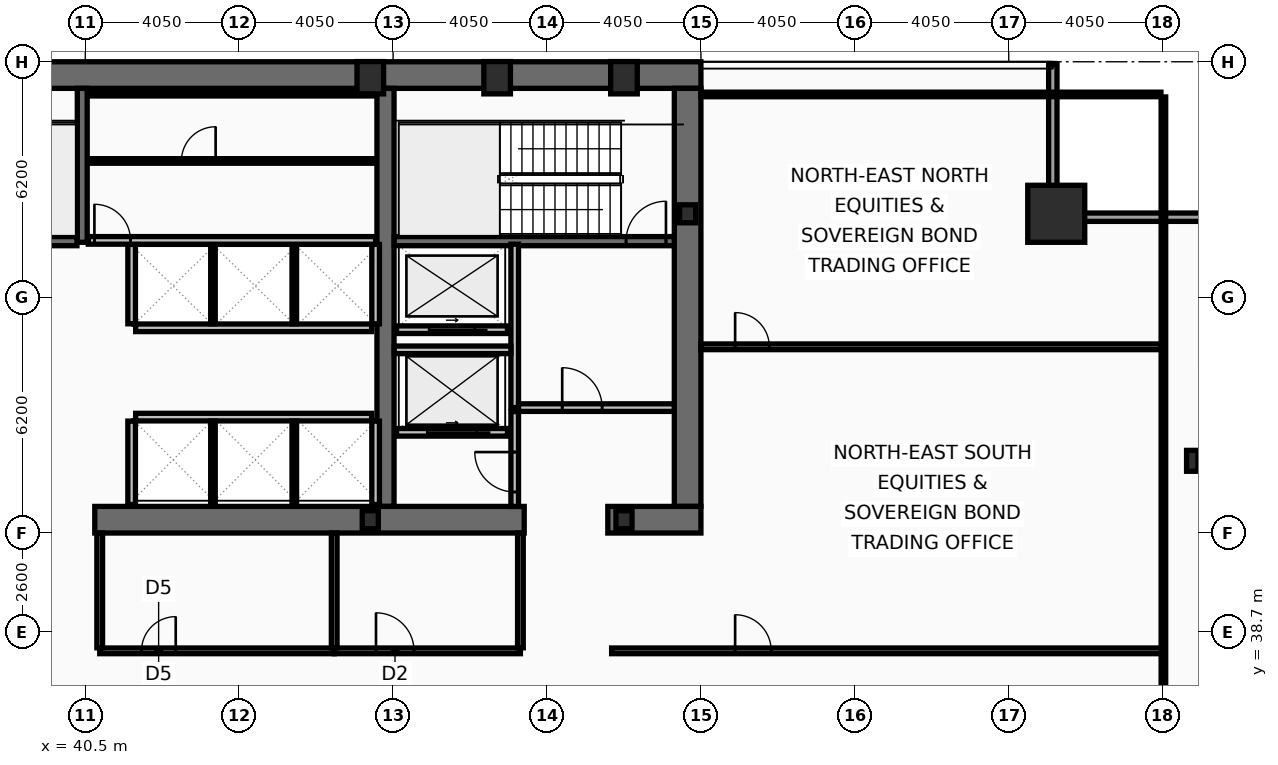
"""IFC4 building model, lengths in metres.
Left out: names, types, materials, properties, quantities, classifications, styles, units other than length and angle.
Written with IfcOpenShell. Run it as: python <this file> out.ifc"""

import sys

from ifc_helpers import new_model, si_unit, direction, frame, frame_2d, origin, origin_2d, place, context, subcontext, project, spatial, rectangle, hollow_rectangle, i_section, extrude, element, fill, save


model = new_model("IFC4")
c1 = context("Model", 3, precision=1e-05, world=origin(), true_north=direction((0.0, 1.0)))
c2 = subcontext(c1, "Body", "Model", "MODEL_VIEW")
j1 = project(units=[si_unit("LENGTHUNIT", "METRE"), si_unit("PLANEANGLEUNIT", "RADIAN")], contexts=[c1])
p1 = place(None, origin())
s1 = spatial("IfcSite", under=j1, at=p1, CompositionType="ELEMENT")
p2 = place(p1, origin())
s2 = spatial("IfcBuilding", under=s1, at=p2, CompositionType="ELEMENT")
p3 = place(p2, frame((0.0, 0.0, 94.6)))
s3 = spatial("IfcBuildingStorey", under=s2, at=p3, CompositionType="ELEMENT", Elevation=94.6)
p4 = place(p3, frame((16.2, 53.35, 0.0), z_axis=(0.0, 0.0, 1.0), x_axis=(1.0, 0.0, 0.0)))
e1 = element("IfcWall", 1, at=p4, inside=s3, PredefinedType="SHEAR", context=c2, shape_type="SweptSolid", body=[
    extrude(rectangle(XDim=40.5, YDim=0.7, at=frame_2d((20.25, 0.0))), origin(), (0.0, 0.0, 1.0), 3.82),
])
p5 = place(p3, frame((56.35, 53.0, 0.0), z_axis=(0.0, 0.0, 1.0), x_axis=(0.0, -1.0, 0.0)))
e2 = element("IfcWall", 2, at=p5, inside=s3, PredefinedType="SHEAR", context=c2, shape_type="SweptSolid", body=[
    extrude(rectangle(XDim=11.0, YDim=0.7, at=frame_2d((5.5, 0.0))), origin(), (0.0, 0.0, 1.0), 3.82),
])
p6 = place(p3, frame((48.4, 42.0, 0.0), z_axis=(0.0, 0.0, 1.0), x_axis=(0.0, 1.0, 0.0)))
e3 = element("IfcWall", 3, at=p6, inside=s3, PredefinedType="SHEAR", context=c2, shape_type="SweptSolid", body=[
    extrude(rectangle(XDim=11.0, YDim=0.45, at=frame_2d((5.5, 0.0))), origin(), (0.0, 0.0, 1.0), 3.82),
])
p7 = place(p3, frame((52.05, 41.65, 0.0), z_axis=(0.0, 0.0, 1.0), x_axis=(-1.0, 0.0, 0.0)))
e4 = element("IfcWall", 4, at=p7, inside=s3, PredefinedType="SHEAR", context=c2, shape_type="SweptSolid", body=[
    extrude(rectangle(XDim=11.3, YDim=0.7, at=frame_2d((5.65, 0.0))), origin(), (0.0, 0.0, 1.0), 3.82),
])
p8 = place(p3, frame((56.7, 41.65, 0.0), z_axis=(0.0, 0.0, 1.0), x_axis=(-1.0, 0.0, 0.0)))
e5 = element("IfcWall", 5, at=p8, inside=s3, PredefinedType="SHEAR", context=c2, shape_type="SweptSolid", body=[
    extrude(rectangle(XDim=2.45, YDim=0.7, at=frame_2d((1.225, 0.0))), origin(), (0.0, 0.0, 1.0), 3.82),
])
p9 = place(p3, frame((40.42, 48.95, 0.0), z_axis=(0.0, 0.0, 1.0), x_axis=(0.0, 1.0, 0.0)))
e6 = element("IfcWall", 6, at=p9, inside=s3, PredefinedType="SHEAR", context=c2, shape_type="SweptSolid", body=[
    extrude(rectangle(XDim=4.05, YDim=0.26, at=frame_2d((2.025, 0.0))), origin(), (0.0, 0.0, 1.0), 3.82),
])
p10 = place(p3, frame((48.63, 48.98, 0.0), z_axis=(0.0, 0.0, 1.0), x_axis=(1.0, 0.0, 0.0)))
e7 = element("IfcWall", 7, at=p10, inside=s3, PredefinedType="SHEAR", context=c2, shape_type="SweptSolid", body=[
    extrude(rectangle(XDim=7.37, YDim=0.24, at=frame_2d((3.685, 0.0))), origin(), (0.0, 0.0, 1.0), 3.82),
])
p11 = place(p10, frame((6.1, 0.0, 0.0)))
e8 = element("IfcOpeningElement", 8, at=p11, cuts=e7, PredefinedType="OPENING", context=c2, shape_type="SweptSolid", body=[
    extrude(rectangle(XDim=1.05, YDim=2.15, at=frame_2d((0.525, 1.075))), frame((0.0, 0.13, 0.0), z_axis=(0.0, -1.0, 0.0), x_axis=(1.0, 0.0, 0.0)), (0.0, 0.0, 1.0), 0.26),
])
p12 = place(p3, frame((32.72, 48.98, 0.0), z_axis=(0.0, 0.0, 1.0), x_axis=(1.0, 0.0, 0.0)))
e9 = element("IfcWall", 9, at=p12, inside=s3, PredefinedType="SHEAR", context=c2, shape_type="SweptSolid", body=[
    extrude(rectangle(XDim=7.56, YDim=0.24, at=frame_2d((3.78, 0.0))), origin(), (0.0, 0.0, 1.0), 3.82),
])
p13 = place(p12, frame((0.22, 0.0, 0.0)))
e10 = element("IfcOpeningElement", 10, at=p13, cuts=e9, PredefinedType="OPENING", context=c2, shape_type="SweptSolid", body=[
    extrude(rectangle(XDim=1.05, YDim=2.15, at=frame_2d((0.525, 1.075))), frame((0.0, 0.13, 0.0), z_axis=(0.0, -1.0, 0.0), x_axis=(1.0, 0.0, 0.0)), (0.0, 0.0, 1.0), 0.26),
])
p14 = place(p3, frame((66.05, 49.7, 0.0), z_axis=(0.0, 0.0, 1.0), x_axis=(1.0, 0.0, 0.0)))
e11 = element("IfcColumn", 11, at=p14, inside=s3, PredefinedType="COLUMN", context=c2, shape_type="SweptSolid", body=[
    extrude(hollow_rectangle(XDim=1.5, YDim=1.5, WallThickness=0.07, at=origin_2d()), origin(), (0.0, 0.0, 1.0), 4.0),
])
for number, where, z_axis, x_axis in (
    (12, (48.0, 53.28, 0.0), (0.0, 0.0, 1.0), (1.0, 0.0, 0.0)),
    (13, (51.337, 53.28, 0.0), (0.0, 0.0, 1.0), (1.0, 0.0, 0.0)),
    (14, (54.675, 53.28, 0.0), (0.0, 0.0, 1.0), (1.0, 0.0, 0.0)),
):
    element("IfcColumn", number, at=place(p3, frame(where, z_axis=z_axis, x_axis=x_axis)), inside=s3, PredefinedType="COLUMN", context=c2, shape_type="SweptSolid", body=[
        extrude(hollow_rectangle(XDim=0.7, YDim=0.85, WallThickness=0.05, at=origin_2d()), origin(), (0.0, 0.0, 1.0), 4.0),
    ])
p15 = place(p3, frame((69.63, 43.2, 0.0), z_axis=(0.0, 0.0, 1.0), x_axis=(1.0, 0.0, 0.0)))
e15 = element("IfcColumn", 15, at=p15, inside=s3, PredefinedType="COLUMN", context=c2, shape_type="SweptSolid", body=[
    extrude(i_section(OverallWidth=0.3, OverallDepth=0.55, WebThickness=0.015, FlangeThickness=0.029, at=origin_2d()), origin(), (0.0, 0.0, 1.0), 4.0),
])
for number, where, z_axis, x_axis in (
    (16, (56.35, 49.7, 0.0), (0.0, 0.0, 1.0), (1.0, 0.0, 0.0)),
    (17, (48.0, 41.65, 0.0), (0.0, 0.0, 1.0), (1.0, 0.0, 0.0)),
    (18, (54.675, 41.65, 0.0), (0.0, 0.0, 1.0), (1.0, 0.0, 0.0)),
):
    element("IfcColumn", number, at=place(p3, frame(where, z_axis=z_axis, x_axis=x_axis)), inside=s3, PredefinedType="COLUMN", context=c2, shape_type="SweptSolid", body=[
        extrude(i_section(OverallWidth=0.424, OverallDepth=0.474, WebThickness=0.048, FlangeThickness=0.077, at=origin_2d()), origin(), (0.0, 0.0, 1.0), 4.0),
    ])
p16 = place(p3, frame((65.96, 53.63, 0.0), z_axis=(0.0, 0.0, 1.0), x_axis=(0.0, -1.0, 0.0)))
e19 = element("IfcWall", 19, at=p16, inside=s3, PredefinedType="SOLIDWALL", context=c2, shape_type="SweptSolid", body=[
    extrude(rectangle(XDim=3.91, YDim=0.22, at=frame_2d((1.955, 0.0))), origin(), (0.0, 0.0, 1.0), 3.16),
])
p17 = place(p3, frame((65.85, 49.61, 0.0), z_axis=(0.0, 0.0, 1.0), x_axis=(1.0, 0.0, 0.0)))
e20 = element("IfcWall", 20, at=p17, inside=s3, PredefinedType="SOLIDWALL", context=c2, shape_type="SweptSolid", body=[
    extrude(rectangle(XDim=4.22, YDim=0.22, at=frame_2d((2.11, 0.0))), origin(), (0.0, 0.0, 1.0), 3.16),
])
p18 = place(p3, frame((51.61, 43.95, 0.0), z_axis=(0.0, 0.0, 1.0), x_axis=(-1.0, 0.0, 0.0)))
e21 = element("IfcWall", 21, at=p18, inside=s3, PredefinedType="PARTITIONING", context=c2, shape_type="SweptSolid", body=[
    extrude(rectangle(XDim=2.92, YDim=0.2, at=frame_2d((1.46, 0.0))), origin(), (0.0, 0.0, 1.0), 3.82),
])
p19 = place(p18, frame((0.81, 0.0, 0.0)))
e22 = element("IfcOpeningElement", 22, at=p19, cuts=e21, PredefinedType="OPENING", context=c2, shape_type="SweptSolid", body=[
    extrude(rectangle(XDim=1.3, YDim=2.18, at=frame_2d((0.65, 1.09))), frame((0.0, 0.11, 0.0), z_axis=(0.0, -1.0, 0.0), x_axis=(1.0, 0.0, 0.0)), (0.0, 0.0, 1.0), 0.22),
])
p20 = place(p3, frame((51.61, 46.65, 0.0), z_axis=(0.0, 0.0, 1.0), x_axis=(-1.0, 0.0, 0.0)))
e23 = element("IfcWall", 23, at=p20, inside=s3, PredefinedType="PARTITIONING", context=c2, shape_type="SweptSolid", body=[
    extrude(rectangle(XDim=2.92, YDim=0.2, at=frame_2d((1.46, 0.0))), origin(), (0.0, 0.0, 1.0), 3.82),
])
p21 = place(p20, frame((0.86, 0.0, 0.0)))
e24 = element("IfcOpeningElement", 24, at=p21, cuts=e23, PredefinedType="OPENING", context=c2, shape_type="SweptSolid", body=[
    extrude(rectangle(XDim=1.2, YDim=2.18, at=frame_2d((0.6, 1.09))), frame((0.0, 0.11, 0.0), z_axis=(0.0, -1.0, 0.0), x_axis=(1.0, 0.0, 0.0)), (0.0, 0.0, 1.0), 0.22),
])
p22 = place(p3, frame((51.8, 44.6, 0.0), z_axis=(0.0, 0.0, 1.0), x_axis=(0.0, 1.0, 0.0)))
e25 = element("IfcWall", 25, at=p22, inside=s3, PredefinedType="PARTITIONING", context=c2, shape_type="SweptSolid", body=[
    extrude(rectangle(XDim=4.3, YDim=0.2, at=frame_2d((2.15, 0.0))), origin(), (0.0, 0.0, 1.0), 3.82),
])
p23 = place(p3, frame((51.9, 44.6, 0.0), z_axis=(0.0, 0.0, 1.0), x_axis=(1.0, 0.0, 0.0)))
e26 = element("IfcWall", 26, at=p23, inside=s3, PredefinedType="PARTITIONING", context=c2, shape_type="SweptSolid", body=[
    extrude(rectangle(XDim=4.1, YDim=0.2, at=frame_2d((2.05, 0.0))), origin(), (0.0, 0.0, 1.0), 3.82),
])
p24 = place(p23, frame((1.15, 0.0, 0.0)))
e27 = element("IfcOpeningElement", 27, at=p24, cuts=e26, PredefinedType="OPENING", context=c2, shape_type="SweptSolid", body=[
    extrude(rectangle(XDim=1.05, YDim=2.15, at=frame_2d((0.525, 1.075))), frame((0.0, 0.11, 0.0), z_axis=(0.0, -1.0, 0.0), x_axis=(1.0, 0.0, 0.0)), (0.0, 0.0, 1.0), 0.22),
])
p25 = place(p3, frame((48.63, 46.12, 0.0), z_axis=(0.0, 0.0, 1.0), x_axis=(1.0, 0.0, 0.0)))
e28 = element("IfcWall", 28, at=p25, inside=s3, PredefinedType="PARTITIONING", context=c2, shape_type="SweptSolid", body=[
    extrude(rectangle(XDim=3.07, YDim=0.2, at=frame_2d((1.535, 0.0))), origin(), (0.0, 0.0, 1.0), 3.82),
])
p26 = place(p3, frame((51.8, 42.0, 0.0), z_axis=(0.0, 0.0, 1.0), x_axis=(0.0, 1.0, 0.0)))
e29 = element("IfcWall", 29, at=p26, inside=s3, PredefinedType="PARTITIONING", context=c2, shape_type="SweptSolid", body=[
    extrude(rectangle(XDim=2.495, YDim=0.2, at=frame_2d((1.248, 0.0))), origin(), (0.0, 0.0, 1.0), 3.82),
])
p27 = place(p26, frame((0.38, 0.0, 0.0)))
e30 = element("IfcOpeningElement", 30, at=p27, cuts=e29, PredefinedType="OPENING", context=c2, shape_type="SweptSolid", body=[
    extrude(rectangle(XDim=1.05, YDim=2.15, at=frame_2d((0.525, 1.075))), frame((0.0, 0.11, 0.0), z_axis=(0.0, -1.0, 0.0), x_axis=(1.0, 0.0, 0.0)), (0.0, 0.0, 1.0), 0.22),
])
p28 = place(p3, frame((41.825, 46.7, 0.0), z_axis=(0.0, 0.0, 1.0), x_axis=(1.0, 0.0, 0.0)))
e31 = element("IfcWall", 31, at=p28, inside=s3, PredefinedType="PARTITIONING", context=c2, shape_type="SweptSolid", body=[
    extrude(rectangle(XDim=6.21, YDim=0.2, at=frame_2d((3.105, 0.0))), origin(), (0.0, 0.0, 1.0), 3.82),
])
for number, where, z_axis, x_axis in (
    (32, (41.72, 46.805, 0.0), (0.0, 0.0, 1.0), (0.0, 1.0, 0.0)),
    (33, (48.14, 46.805, 0.0), (0.0, 0.0, 1.0), (0.0, 1.0, 0.0)),
):
    element("IfcWall", number, at=place(p3, frame(where, z_axis=z_axis, x_axis=x_axis)), inside=s3, PredefinedType="PARTITIONING", context=c2, shape_type="SweptSolid", body=[
        extrude(rectangle(XDim=2.09, YDim=0.2, at=frame_2d((1.045, 0.0))), origin(), (0.0, 0.0, 1.0), 3.82),
    ])
for number, where, z_axis, x_axis in (
    (34, (43.86, 46.805, 0.0), (0.0, 0.0, 1.0), (0.0, 1.0, 0.0)),
    (35, (46.0, 46.805, 0.0), (0.0, 0.0, 1.0), (0.0, 1.0, 0.0)),
):
    element("IfcWall", number, at=place(p3, frame(where, z_axis=z_axis, x_axis=x_axis)), inside=s3, PredefinedType="PARTITIONING", context=c2, shape_type="SweptSolid", body=[
        extrude(rectangle(XDim=2.09, YDim=0.12, at=frame_2d((1.045, 0.0))), origin(), (0.0, 0.0, 1.0), 3.82),
    ])
p29 = place(p3, frame((41.825, 44.35, 0.0), z_axis=(0.0, 0.0, 1.0), x_axis=(1.0, 0.0, 0.0)))
e36 = element("IfcWall", 36, at=p29, inside=s3, PredefinedType="PARTITIONING", context=c2, shape_type="SweptSolid", body=[
    extrude(rectangle(XDim=6.21, YDim=0.2, at=frame_2d((3.105, 0.0))), origin(), (0.0, 0.0, 1.0), 3.82),
])
for number, where, z_axis, x_axis in (
    (37, (41.72, 42.05, 0.0), (0.0, 0.0, 1.0), (0.0, 1.0, 0.0)),
    (38, (48.14, 42.05, 0.0), (0.0, 0.0, 1.0), (0.0, 1.0, 0.0)),
):
    element("IfcWall", number, at=place(p3, frame(where, z_axis=z_axis, x_axis=x_axis)), inside=s3, PredefinedType="PARTITIONING", context=c2, shape_type="SweptSolid", body=[
        extrude(rectangle(XDim=2.195, YDim=0.2, at=frame_2d((1.098, 0.0))), origin(), (0.0, 0.0, 1.0), 3.82),
    ])
for number, where, z_axis, x_axis in (
    (39, (43.86, 42.05, 0.0), (0.0, 0.0, 1.0), (0.0, 1.0, 0.0)),
    (40, (46.0, 42.05, 0.0), (0.0, 0.0, 1.0), (0.0, 1.0, 0.0)),
):
    element("IfcWall", number, at=place(p3, frame(where, z_axis=z_axis, x_axis=x_axis)), inside=s3, PredefinedType="PARTITIONING", context=c2, shape_type="SweptSolid", body=[
        extrude(rectangle(XDim=2.195, YDim=0.12, at=frame_2d((1.098, 0.0))), origin(), (0.0, 0.0, 1.0), 3.82),
    ])
p30 = place(p3, frame((40.58, 52.86, 0.0), z_axis=(0.0, 0.0, 1.0), x_axis=(1.0, 0.0, 0.0)))
e41 = element("IfcWall", 41, at=p30, inside=s3, PredefinedType="PARTITIONING", context=c2, shape_type="SweptSolid", body=[
    extrude(rectangle(XDim=7.56, YDim=0.12, at=frame_2d((3.78, 0.0))), origin(), (0.0, 0.0, 1.0), 3.82),
])
p31 = place(p3, frame((40.58, 49.0, 0.0), z_axis=(0.0, 0.0, 1.0), x_axis=(1.0, 0.0, 0.0)))
e42 = element("IfcWall", 42, at=p31, inside=s3, PredefinedType="PARTITIONING", context=c2, shape_type="SweptSolid", body=[
    extrude(rectangle(XDim=7.56, YDim=0.2, at=frame_2d((3.78, 0.0))), origin(), (0.0, 0.0, 1.0), 3.82),
])
p32 = place(p31, frame((0.16, 0.0, 0.0)))
e43 = element("IfcOpeningElement", 43, at=p32, cuts=e42, PredefinedType="OPENING", context=c2, shape_type="SweptSolid", body=[
    extrude(rectangle(XDim=0.95, YDim=2.1, at=frame_2d((0.475, 1.05))), frame((0.0, 0.11, 0.0), z_axis=(0.0, -1.0, 0.0), x_axis=(1.0, 0.0, 0.0)), (0.0, 0.0, 1.0), 0.22),
])
p33 = place(p3, frame((40.63, 51.09, 0.0), z_axis=(0.0, 0.0, 1.0), x_axis=(1.0, 0.0, 0.0)))
e44 = element("IfcWall", 44, at=p33, inside=s3, PredefinedType="PARTITIONING", context=c2, shape_type="SweptSolid", body=[
    extrude(rectangle(XDim=7.46, YDim=0.12, at=frame_2d((3.73, 0.0))), origin(), (0.0, 0.0, 1.0), 3.82),
])
p34 = place(p33, frame((2.4, 0.0, 0.0)))
e45 = element("IfcOpeningElement", 45, at=p34, cuts=e44, PredefinedType="OPENING", context=c2, shape_type="SweptSolid", body=[
    extrude(rectangle(XDim=0.9, YDim=2.05, at=frame_2d((0.45, 1.025))), frame((0.0, 0.07, 0.0), z_axis=(0.0, -1.0, 0.0), x_axis=(1.0, 0.0, 0.0)), (0.0, 0.0, 1.0), 0.14),
])
p35 = place(p3, frame((40.88, 38.2, 0.0), z_axis=(0.0, 0.0, 1.0), x_axis=(1.0, 0.0, 0.0)))
e46 = element("IfcWall", 46, at=p35, inside=s3, PredefinedType="PARTITIONING", context=c2, shape_type="SweptSolid", body=[
    extrude(rectangle(XDim=6.17, YDim=0.15, at=frame_2d((3.085, 0.0))), origin(), (0.0, 0.0, 1.0), 3.01),
])
p36 = place(p35, frame((1.1, 0.0, 0.0)))
e47 = element("IfcOpeningElement", 47, at=p36, cuts=e46, PredefinedType="OPENING", context=c2, shape_type="SweptSolid", body=[
    extrude(rectangle(XDim=0.9, YDim=2.05, at=frame_2d((0.45, 1.025))), frame((0.0, 0.085, 0.0), z_axis=(0.0, -1.0, 0.0), x_axis=(1.0, 0.0, 0.0)), (0.0, 0.0, 1.0), 0.17),
])
p37 = place(p3, frame((47.05, 38.2, 0.0), z_axis=(0.0, 0.0, 1.0), x_axis=(1.0, 0.0, 0.0)))
e48 = element("IfcWall", 48, at=p37, inside=s3, PredefinedType="PARTITIONING", context=c2, shape_type="SweptSolid", body=[
    extrude(rectangle(XDim=4.9, YDim=0.15, at=frame_2d((2.45, 0.0))), origin(), (0.0, 0.0, 1.0), 3.01),
])
p38 = place(p37, frame((1.1, 0.0, 0.0)))
e49 = element("IfcOpeningElement", 49, at=p38, cuts=e48, PredefinedType="OPENING", context=c2, shape_type="SweptSolid", body=[
    extrude(rectangle(XDim=1.0, YDim=2.05, at=frame_2d((0.5, 1.025))), frame((0.0, 0.085, 0.0), z_axis=(0.0, -1.0, 0.0), x_axis=(1.0, 0.0, 0.0)), (0.0, 0.0, 1.0), 0.17),
])
for number, where, z_axis, x_axis in (
    (50, (40.88, 38.28, 0.0), (0.0, 0.0, 1.0), (0.0, 1.0, 0.0)),
    (51, (47.05, 38.28, 0.0), (0.0, 0.0, 1.0), (0.0, 1.0, 0.0)),
    (52, (51.95, 38.28, 0.0), (0.0, 0.0, 1.0), (0.0, 1.0, 0.0)),
):
    element("IfcWall", number, at=place(p3, frame(where, z_axis=z_axis, x_axis=x_axis)), inside=s3, PredefinedType="PARTITIONING", context=c2, shape_type="SweptSolid", body=[
        extrude(rectangle(XDim=3.02, YDim=0.15, at=frame_2d((1.51, 0.0))), origin(), (0.0, 0.0, 1.0), 3.82),
    ])
p39 = place(p3, frame((54.35, 38.2, 0.0), z_axis=(0.0, 0.0, 1.0), x_axis=(1.0, 0.0, 0.0)))
e53 = element("IfcWall", 53, at=p39, inside=s3, PredefinedType="PARTITIONING", context=c2, shape_type="SweptSolid", body=[
    extrude(rectangle(XDim=14.52, YDim=0.15, at=frame_2d((7.26, 0.0))), origin(), (0.0, 0.0, 1.0), 3.01),
])
p40 = place(p39, frame((3.25, 0.0, 0.0)))
e54 = element("IfcOpeningElement", 54, at=p40, cuts=e53, PredefinedType="OPENING", context=c2, shape_type="SweptSolid", body=[
    extrude(rectangle(XDim=0.95, YDim=2.05, at=frame_2d((0.475, 1.025))), frame((0.0, 0.085, 0.0), z_axis=(0.0, -1.0, 0.0), x_axis=(1.0, 0.0, 0.0)), (0.0, 0.0, 1.0), 0.17),
])
p41 = place(p3, frame((56.7, 46.2, 0.0), z_axis=(0.0, 0.0, 1.0), x_axis=(1.0, 0.0, 0.0)))
e55 = element("IfcWall", 55, at=p41, inside=s3, PredefinedType="PARTITIONING", context=c2, shape_type="SweptSolid", body=[
    extrude(rectangle(XDim=12.105, YDim=0.15, at=frame_2d((6.052, 0.0))), origin(), (0.0, 0.0, 1.0), 3.16),
])
p42 = place(p41, frame((0.9, 0.0, 0.0)))
e56 = element("IfcOpeningElement", 56, at=p42, cuts=e55, PredefinedType="OPENING", context=c2, shape_type="SweptSolid", body=[
    extrude(rectangle(XDim=0.9, YDim=2.05, at=frame_2d((0.45, 1.025))), frame((0.0, 0.085, 0.0), z_axis=(0.0, -1.0, 0.0), x_axis=(1.0, 0.0, 0.0)), (0.0, 0.0, 1.0), 0.17),
])
p43 = place(p3, frame((68.87, 10.665, 0.0), z_axis=(0.0, 0.0, 1.0), x_axis=(0.0, 1.0, 0.0)))
e57 = element("IfcWall", 57, at=p43, inside=s3, PredefinedType="PARTITIONING", context=c2, shape_type="SweptSolid", body=[
    extrude(rectangle(XDim=42.11, YDim=0.12, at=frame_2d((21.055, 0.0))), origin(), (0.0, 0.0, 1.0), 3.01),
])
p44 = place(p3, frame((56.7, 52.84, 0.0), z_axis=(0.0, 0.0, 1.0), x_axis=(1.0, 0.0, 0.0)))
e58 = element("IfcWall", 58, at=p44, inside=s3, PredefinedType="PARTITIONING", context=c2, shape_type="SweptSolid", body=[
    extrude(rectangle(XDim=12.105, YDim=0.12, at=frame_2d((6.052, 0.0))), origin(), (0.0, 0.0, 1.0), 3.82),
])
p45 = place(p11, origin())
e59 = element("IfcDoor", 59, at=p45, inside=s3, OperationType="SINGLE_SWING_RIGHT", PredefinedType="DOOR", context=c2, shape_type="SweptSolid", body=[
    extrude(rectangle(XDim=1.05, YDim=2.15, at=frame_2d((0.525, 1.075))), frame((0.0, 0.025, 0.0), z_axis=(0.0, -1.0, 0.0), x_axis=(1.0, 0.0, 0.0)), (0.0, 0.0, 1.0), 0.05),
])
fill(e8, e59)
p46 = place(p19, origin())
e60 = element("IfcDoor", 60, at=p46, inside=s3, OperationType="SLIDING_TO_LEFT", PredefinedType="DOOR", context=c2, shape_type="SweptSolid", body=[
    extrude(rectangle(XDim=1.3, YDim=2.18, at=frame_2d((0.65, 1.09))), frame((0.0, 0.025, 0.0), z_axis=(0.0, -1.0, 0.0), x_axis=(1.0, 0.0, 0.0)), (0.0, 0.0, 1.0), 0.05),
])
fill(e22, e60)
p47 = place(p21, origin())
e61 = element("IfcDoor", 61, at=p47, inside=s3, OperationType="SLIDING_TO_LEFT", PredefinedType="DOOR", context=c2, shape_type="SweptSolid", body=[
    extrude(rectangle(XDim=1.2, YDim=2.18, at=frame_2d((0.6, 1.09))), frame((0.0, 0.025, 0.0), z_axis=(0.0, -1.0, 0.0), x_axis=(1.0, 0.0, 0.0)), (0.0, 0.0, 1.0), 0.05),
])
fill(e24, e61)
p48 = place(p24, origin())
e62 = element("IfcDoor", 62, at=p48, inside=s3, OperationType="SINGLE_SWING_LEFT", PredefinedType="DOOR", context=c2, shape_type="SweptSolid", body=[
    extrude(rectangle(XDim=1.05, YDim=2.15, at=frame_2d((0.525, 1.075))), frame((0.0, 0.025, 0.0), z_axis=(0.0, -1.0, 0.0), x_axis=(1.0, 0.0, 0.0)), (0.0, 0.0, 1.0), 0.05),
])
fill(e27, e62)
p49 = place(p27, origin())
e63 = element("IfcDoor", 63, at=p49, inside=s3, OperationType="SINGLE_SWING_RIGHT", PredefinedType="DOOR", context=c2, shape_type="SweptSolid", body=[
    extrude(rectangle(XDim=1.05, YDim=2.15, at=frame_2d((0.525, 1.075))), frame((0.0, 0.025, 0.0), z_axis=(0.0, -1.0, 0.0), x_axis=(1.0, 0.0, 0.0)), (0.0, 0.0, 1.0), 0.05),
])
fill(e30, e63)
p50 = place(p32, origin())
e64 = element("IfcDoor", 64, at=p50, inside=s3, OperationType="SINGLE_SWING_LEFT", PredefinedType="DOOR", context=c2, shape_type="SweptSolid", body=[
    extrude(rectangle(XDim=0.95, YDim=2.1, at=frame_2d((0.475, 1.05))), frame((0.0, 0.025, 0.0), z_axis=(0.0, -1.0, 0.0), x_axis=(1.0, 0.0, 0.0)), (0.0, 0.0, 1.0), 0.05),
])
fill(e43, e64)
p51 = place(p34, origin())
e65 = element("IfcDoor", 65, at=p51, inside=s3, OperationType="SINGLE_SWING_RIGHT", PredefinedType="DOOR", context=c2, shape_type="SweptSolid", body=[
    extrude(rectangle(XDim=0.9, YDim=2.05, at=frame_2d((0.45, 1.025))), frame((0.0, 0.025, 0.0), z_axis=(0.0, -1.0, 0.0), x_axis=(1.0, 0.0, 0.0)), (0.0, 0.0, 1.0), 0.05),
])
fill(e45, e65)
p52 = place(p36, origin())
e66 = element("IfcDoor", 66, at=p52, inside=s3, OperationType="SINGLE_SWING_RIGHT", PredefinedType="DOOR", context=c2, shape_type="SweptSolid", body=[
    extrude(rectangle(XDim=0.9, YDim=2.05, at=frame_2d((0.45, 1.025))), frame((0.0, 0.025, 0.0), z_axis=(0.0, -1.0, 0.0), x_axis=(1.0, 0.0, 0.0)), (0.0, 0.0, 1.0), 0.05),
])
fill(e47, e66)
p53 = place(p38, origin())
e67 = element("IfcDoor", 67, at=p53, inside=s3, OperationType="SINGLE_SWING_LEFT", PredefinedType="DOOR", context=c2, shape_type="SweptSolid", body=[
    extrude(rectangle(XDim=1.0, YDim=2.05, at=frame_2d((0.5, 1.025))), frame((0.0, 0.025, 0.0), z_axis=(0.0, -1.0, 0.0), x_axis=(1.0, 0.0, 0.0)), (0.0, 0.0, 1.0), 0.05),
])
fill(e49, e67)
p54 = place(p40, origin())
e68 = element("IfcDoor", 68, at=p54, inside=s3, OperationType="SINGLE_SWING_LEFT", PredefinedType="DOOR", context=c2, shape_type="SweptSolid", body=[
    extrude(rectangle(XDim=0.95, YDim=2.05, at=frame_2d((0.475, 1.025))), frame((0.0, 0.025, 0.0), z_axis=(0.0, -1.0, 0.0), x_axis=(1.0, 0.0, 0.0)), (0.0, 0.0, 1.0), 0.05),
])
fill(e54, e68)
p55 = place(p42, origin())
e69 = element("IfcDoor", 69, at=p55, inside=s3, OperationType="SINGLE_SWING_LEFT", PredefinedType="DOOR", context=c2, shape_type="SweptSolid", body=[
    extrude(rectangle(XDim=0.9, YDim=2.05, at=frame_2d((0.45, 1.025))), frame((0.0, 0.025, 0.0), z_axis=(0.0, -1.0, 0.0), x_axis=(1.0, 0.0, 0.0)), (0.0, 0.0, 1.0), 0.05),
])
fill(e56, e69)
save(model, sys.argv[1])
